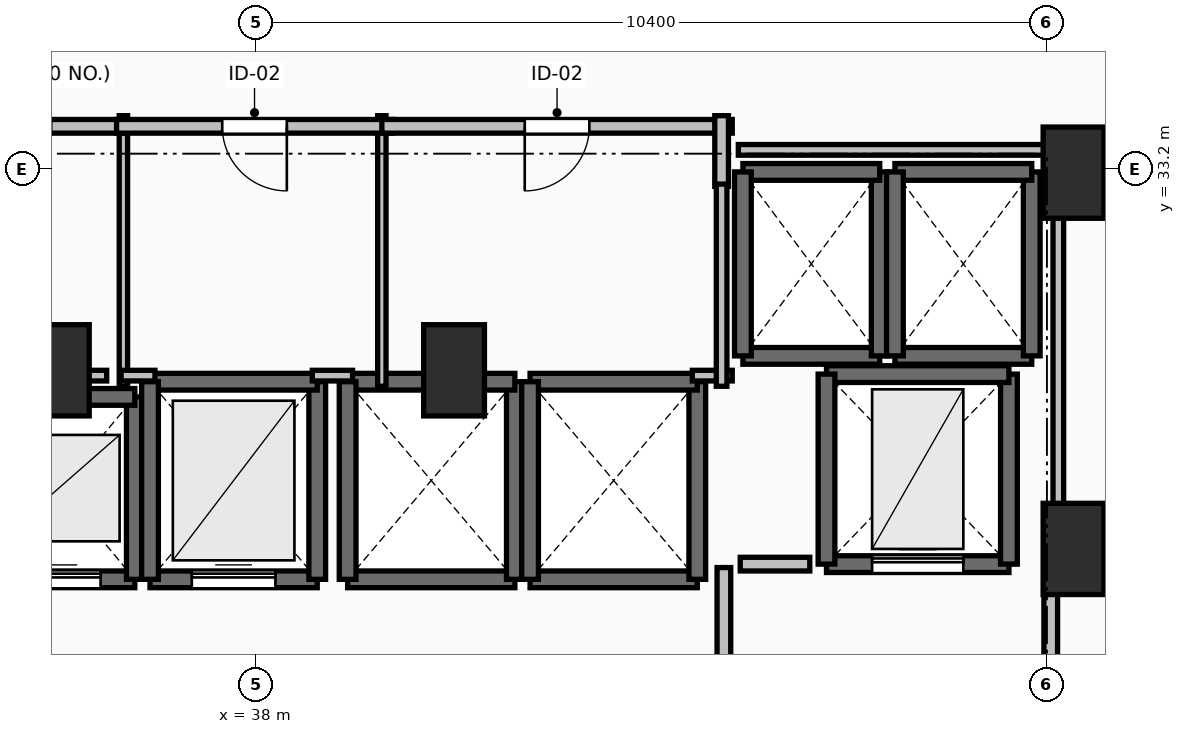
"""IFC4 building model, lengths in metres.
Left out: names, types, materials, properties, quantities, classifications, styles, units other than length and angle.
Written with IfcOpenShell. Run it as: python <this file> out.ifc"""

import sys

from ifc_helpers import new_model, si_unit, direction, frame, frame_2d, origin, origin_2d, place, context, subcontext, project, spatial, rectangle, extrude, element, fill, save


model = new_model("IFC4")
c1 = context("Model", 3, precision=1e-05, world=origin(), true_north=direction((0.0, 1.0)))
c2 = subcontext(c1, "Body", "Model", "MODEL_VIEW")
j1 = project(units=[si_unit("LENGTHUNIT", "METRE"), si_unit("PLANEANGLEUNIT", "RADIAN")], contexts=[c1])
p1 = place(None, origin())
s1 = spatial("IfcSite", under=j1, at=p1, CompositionType="ELEMENT")
p2 = place(p1, origin())
s2 = spatial("IfcBuilding", under=s1, at=p2, CompositionType="ELEMENT")
p3 = place(p2, frame((0.0, 0.0, 24.0)))
s3 = spatial("IfcBuildingStorey", under=s2, at=p3, CompositionType="ELEMENT", Elevation=24.0)
for number, where, z_axis, x_axis in (
    (1, (48.75, 33.15, 0.0), (0.0, 0.0, 1.0), (1.0, 0.0, 0.0)),
    (2, (48.75, 28.2, 0.0), (0.0, 0.0, 1.0), (1.0, 0.0, 0.0)),
    (3, (35.4, 30.55, 0.0), (0.0, 0.0, 1.0), (1.0, 0.0, 0.0)),
    (4, (40.6, 30.55, 0.0), (0.0, 0.0, 1.0), (1.0, 0.0, 0.0)),
):
    element("IfcColumn", number, at=place(p3, frame(where, z_axis=z_axis, x_axis=x_axis)), inside=s3, PredefinedType="PILASTER", context=c2, shape_type="SweptSolid", body=[
        extrude(rectangle(XDim=0.8, YDim=1.2, at=origin_2d()), origin(), (0.0, 0.0, 1.0), 3.5),
    ])
p4 = place(p3, frame((34.4, 27.8, 0.0), z_axis=(0.0, 0.0, 1.0), x_axis=(1.0, 0.0, 0.0)))
e5 = element("IfcWall", 5, at=p4, inside=s3, PredefinedType="SOLIDWALL", context=c2, shape_type="SweptSolid", body=[
    extrude(rectangle(XDim=2.0, YDim=0.22, at=frame_2d((1.0, 0.0))), origin(), (0.0, 0.0, 1.0), 3.24),
])
p5 = place(p4, frame((0.45, 0.0, 0.0)))
e6 = element("IfcOpeningElement", 6, at=p5, cuts=e5, PredefinedType="OPENING", context=c2, shape_type="SweptSolid", body=[
    extrude(rectangle(XDim=1.1, YDim=2.2, at=frame_2d((0.55, 1.1))), frame((0.0, 0.125, 0.0), z_axis=(0.0, -1.0, 0.0), x_axis=(1.0, 0.0, 0.0)), (0.0, 0.0, 1.0), 0.25),
])
p6 = place(p3, frame((36.4, 27.8, 0.0), z_axis=(0.0, 0.0, 1.0), x_axis=(0.0, 1.0, 0.0)))
e7 = element("IfcWall", 7, at=p6, inside=s3, PredefinedType="SOLIDWALL", context=c2, shape_type="SweptSolid", body=[
    extrude(rectangle(XDim=2.4, YDim=0.22, at=frame_2d((1.2, 0.0))), origin(), (0.0, 0.0, 1.0), 3.24),
])
p7 = place(p3, frame((36.4, 30.2, 0.0), z_axis=(0.0, 0.0, 1.0), x_axis=(-1.0, 0.0, 0.0)))
e8 = element("IfcWall", 8, at=p7, inside=s3, PredefinedType="SOLIDWALL", context=c2, shape_type="SweptSolid", body=[
    extrude(rectangle(XDim=2.0, YDim=0.22, at=frame_2d((1.0, 0.0))), origin(), (0.0, 0.0, 1.0), 3.24),
])
p8 = place(p3, frame((36.6, 27.8, 0.0), z_axis=(0.0, 0.0, 1.0), x_axis=(1.0, 0.0, 0.0)))
e9 = element("IfcWall", 9, at=p8, inside=s3, PredefinedType="SOLIDWALL", context=c2, shape_type="SweptSolid", body=[
    extrude(rectangle(XDim=2.2, YDim=0.22, at=frame_2d((1.1, 0.0))), origin(), (0.0, 0.0, 1.0), 3.24),
])
p9 = place(p8, frame((0.55, 0.0, 0.0)))
e10 = element("IfcOpeningElement", 10, at=p9, cuts=e9, PredefinedType="OPENING", context=c2, shape_type="SweptSolid", body=[
    extrude(rectangle(XDim=1.1, YDim=2.2, at=frame_2d((0.55, 1.1))), frame((0.0, 0.125, 0.0), z_axis=(0.0, -1.0, 0.0), x_axis=(1.0, 0.0, 0.0)), (0.0, 0.0, 1.0), 0.25),
])
p10 = place(p3, frame((38.8, 27.8, 0.0), z_axis=(0.0, 0.0, 1.0), x_axis=(0.0, 1.0, 0.0)))
e11 = element("IfcWall", 11, at=p10, inside=s3, PredefinedType="SOLIDWALL", context=c2, shape_type="SweptSolid", body=[
    extrude(rectangle(XDim=2.6, YDim=0.22, at=frame_2d((1.3, 0.0))), origin(), (0.0, 0.0, 1.0), 3.24),
])
p11 = place(p3, frame((38.8, 30.4, 0.0), z_axis=(0.0, 0.0, 1.0), x_axis=(-1.0, 0.0, 0.0)))
e12 = element("IfcWall", 12, at=p11, inside=s3, PredefinedType="SOLIDWALL", context=c2, shape_type="SweptSolid", body=[
    extrude(rectangle(XDim=2.2, YDim=0.22, at=frame_2d((1.1, 0.0))), origin(), (0.0, 0.0, 1.0), 3.24),
])
p12 = place(p3, frame((36.6, 30.4, 0.0), z_axis=(0.0, 0.0, 1.0), x_axis=(0.0, -1.0, 0.0)))
e13 = element("IfcWall", 13, at=p12, inside=s3, PredefinedType="SOLIDWALL", context=c2, shape_type="SweptSolid", body=[
    extrude(rectangle(XDim=2.6, YDim=0.22, at=frame_2d((1.3, 0.0))), origin(), (0.0, 0.0, 1.0), 3.24),
])
p13 = place(p3, frame((39.2, 27.8, 0.0), z_axis=(0.0, 0.0, 1.0), x_axis=(1.0, 0.0, 0.0)))
e14 = element("IfcWall", 14, at=p13, inside=s3, PredefinedType="SOLIDWALL", context=c2, shape_type="SweptSolid", body=[
    extrude(rectangle(XDim=2.2, YDim=0.22, at=frame_2d((1.1, 0.0))), origin(), (0.0, 0.0, 1.0), 3.24),
])
p14 = place(p3, frame((41.4, 27.8, 0.0), z_axis=(0.0, 0.0, 1.0), x_axis=(0.0, 1.0, 0.0)))
e15 = element("IfcWall", 15, at=p14, inside=s3, PredefinedType="SOLIDWALL", context=c2, shape_type="SweptSolid", body=[
    extrude(rectangle(XDim=2.6, YDim=0.22, at=frame_2d((1.3, 0.0))), origin(), (0.0, 0.0, 1.0), 3.24),
])
p15 = place(p3, frame((41.4, 30.4, 0.0), z_axis=(0.0, 0.0, 1.0), x_axis=(-1.0, 0.0, 0.0)))
e16 = element("IfcWall", 16, at=p15, inside=s3, PredefinedType="SOLIDWALL", context=c2, shape_type="SweptSolid", body=[
    extrude(rectangle(XDim=2.2, YDim=0.22, at=frame_2d((1.1, 0.0))), origin(), (0.0, 0.0, 1.0), 3.24),
])
p16 = place(p3, frame((39.2, 30.4, 0.0), z_axis=(0.0, 0.0, 1.0), x_axis=(0.0, -1.0, 0.0)))
e17 = element("IfcWall", 17, at=p16, inside=s3, PredefinedType="SOLIDWALL", context=c2, shape_type="SweptSolid", body=[
    extrude(rectangle(XDim=2.6, YDim=0.22, at=frame_2d((1.3, 0.0))), origin(), (0.0, 0.0, 1.0), 3.24),
])
p17 = place(p3, frame((41.6, 27.8, 0.0), z_axis=(0.0, 0.0, 1.0), x_axis=(1.0, 0.0, 0.0)))
e18 = element("IfcWall", 18, at=p17, inside=s3, PredefinedType="SOLIDWALL", context=c2, shape_type="SweptSolid", body=[
    extrude(rectangle(XDim=2.2, YDim=0.22, at=frame_2d((1.1, 0.0))), origin(), (0.0, 0.0, 1.0), 3.24),
])
p18 = place(p3, frame((43.8, 27.8, 0.0), z_axis=(0.0, 0.0, 1.0), x_axis=(0.0, 1.0, 0.0)))
e19 = element("IfcWall", 19, at=p18, inside=s3, PredefinedType="SOLIDWALL", context=c2, shape_type="SweptSolid", body=[
    extrude(rectangle(XDim=2.6, YDim=0.22, at=frame_2d((1.3, 0.0))), origin(), (0.0, 0.0, 1.0), 3.24),
])
p19 = place(p3, frame((43.8, 30.4, 0.0), z_axis=(0.0, 0.0, 1.0), x_axis=(-1.0, 0.0, 0.0)))
e20 = element("IfcWall", 20, at=p19, inside=s3, PredefinedType="SOLIDWALL", context=c2, shape_type="SweptSolid", body=[
    extrude(rectangle(XDim=2.2, YDim=0.22, at=frame_2d((1.1, 0.0))), origin(), (0.0, 0.0, 1.0), 3.24),
])
p20 = place(p3, frame((41.6, 30.4, 0.0), z_axis=(0.0, 0.0, 1.0), x_axis=(0.0, -1.0, 0.0)))
e21 = element("IfcWall", 21, at=p20, inside=s3, PredefinedType="SOLIDWALL", context=c2, shape_type="SweptSolid", body=[
    extrude(rectangle(XDim=2.6, YDim=0.22, at=frame_2d((1.3, 0.0))), origin(), (0.0, 0.0, 1.0), 3.24),
])
p21 = place(p3, frame((44.4, 30.74, 0.0), z_axis=(0.0, 0.0, 1.0), x_axis=(1.0, 0.0, 0.0)))
e22 = element("IfcWall", 22, at=p21, inside=s3, PredefinedType="SOLIDWALL", context=c2, shape_type="SweptSolid", body=[
    extrude(rectangle(XDim=1.8, YDim=0.22, at=frame_2d((0.9, 0.0))), origin(), (0.0, 0.0, 1.0), 3.24),
])
p22 = place(p3, frame((46.2, 30.74, 0.0), z_axis=(0.0, 0.0, 1.0), x_axis=(0.0, 1.0, 0.0)))
e23 = element("IfcWall", 23, at=p22, inside=s3, PredefinedType="SOLIDWALL", context=c2, shape_type="SweptSolid", body=[
    extrude(rectangle(XDim=2.42, YDim=0.22, at=frame_2d((1.21, 0.0))), origin(), (0.0, 0.0, 1.0), 3.24),
])
p23 = place(p3, frame((46.2, 33.16, 0.0), z_axis=(0.0, 0.0, 1.0), x_axis=(-1.0, 0.0, 0.0)))
e24 = element("IfcWall", 24, at=p23, inside=s3, PredefinedType="SOLIDWALL", context=c2, shape_type="SweptSolid", body=[
    extrude(rectangle(XDim=1.8, YDim=0.22, at=frame_2d((0.9, 0.0))), origin(), (0.0, 0.0, 1.0), 3.24),
])
p24 = place(p3, frame((44.4, 33.16, 0.0), z_axis=(0.0, 0.0, 1.0), x_axis=(0.0, -1.0, 0.0)))
e25 = element("IfcWall", 25, at=p24, inside=s3, PredefinedType="SOLIDWALL", context=c2, shape_type="SweptSolid", body=[
    extrude(rectangle(XDim=2.42, YDim=0.22, at=frame_2d((1.21, 0.0))), origin(), (0.0, 0.0, 1.0), 3.24),
])
p25 = place(p3, frame((46.4, 30.74, 0.0), z_axis=(0.0, 0.0, 1.0), x_axis=(1.0, 0.0, 0.0)))
e26 = element("IfcWall", 26, at=p25, inside=s3, PredefinedType="SOLIDWALL", context=c2, shape_type="SweptSolid", body=[
    extrude(rectangle(XDim=1.8, YDim=0.22, at=frame_2d((0.9, 0.0))), origin(), (0.0, 0.0, 1.0), 3.24),
])
p26 = place(p3, frame((48.2, 30.74, 0.0), z_axis=(0.0, 0.0, 1.0), x_axis=(0.0, 1.0, 0.0)))
e27 = element("IfcWall", 27, at=p26, inside=s3, PredefinedType="SOLIDWALL", context=c2, shape_type="SweptSolid", body=[
    extrude(rectangle(XDim=2.42, YDim=0.22, at=frame_2d((1.21, 0.0))), origin(), (0.0, 0.0, 1.0), 3.24),
])
p27 = place(p3, frame((48.2, 33.16, 0.0), z_axis=(0.0, 0.0, 1.0), x_axis=(-1.0, 0.0, 0.0)))
e28 = element("IfcWall", 28, at=p27, inside=s3, PredefinedType="SOLIDWALL", context=c2, shape_type="SweptSolid", body=[
    extrude(rectangle(XDim=1.8, YDim=0.22, at=frame_2d((0.9, 0.0))), origin(), (0.0, 0.0, 1.0), 3.24),
])
p28 = place(p3, frame((46.4, 33.16, 0.0), z_axis=(0.0, 0.0, 1.0), x_axis=(0.0, -1.0, 0.0)))
e29 = element("IfcWall", 29, at=p28, inside=s3, PredefinedType="SOLIDWALL", context=c2, shape_type="SweptSolid", body=[
    extrude(rectangle(XDim=2.42, YDim=0.22, at=frame_2d((1.21, 0.0))), origin(), (0.0, 0.0, 1.0), 3.24),
])
p29 = place(p3, frame((45.5, 28.0, 0.0), z_axis=(0.0, 0.0, 1.0), x_axis=(1.0, 0.0, 0.0)))
e30 = element("IfcWall", 30, at=p29, inside=s3, PredefinedType="SHEAR", context=c2, shape_type="SweptSolid", body=[
    extrude(rectangle(XDim=2.4, YDim=0.22, at=frame_2d((1.2, 0.0))), origin(), (0.0, 0.0, 1.0), 3.24),
])
p30 = place(p29, frame((0.6, 0.0, 0.0)))
e31 = element("IfcOpeningElement", 31, at=p30, cuts=e30, PredefinedType="OPENING", context=c2, shape_type="SweptSolid", body=[
    extrude(rectangle(XDim=1.2, YDim=2.2, at=frame_2d((0.6, 1.1))), frame((0.0, 0.125, 0.0), z_axis=(0.0, -1.0, 0.0), x_axis=(1.0, 0.0, 0.0)), (0.0, 0.0, 1.0), 0.25),
])
p31 = place(p3, frame((47.9, 28.0, 0.0), z_axis=(0.0, 0.0, 1.0), x_axis=(0.0, 1.0, 0.0)))
e32 = element("IfcWall", 32, at=p31, inside=s3, PredefinedType="SHEAR", context=c2, shape_type="SweptSolid", body=[
    extrude(rectangle(XDim=2.5, YDim=0.22, at=frame_2d((1.25, 0.0))), origin(), (0.0, 0.0, 1.0), 3.24),
])
p32 = place(p3, frame((47.9, 30.5, 0.0), z_axis=(0.0, 0.0, 1.0), x_axis=(-1.0, 0.0, 0.0)))
e33 = element("IfcWall", 33, at=p32, inside=s3, PredefinedType="SHEAR", context=c2, shape_type="SweptSolid", body=[
    extrude(rectangle(XDim=2.4, YDim=0.22, at=frame_2d((1.2, 0.0))), origin(), (0.0, 0.0, 1.0), 3.24),
])
p33 = place(p3, frame((45.5, 30.5, 0.0), z_axis=(0.0, 0.0, 1.0), x_axis=(0.0, -1.0, 0.0)))
e34 = element("IfcWall", 34, at=p33, inside=s3, PredefinedType="SHEAR", context=c2, shape_type="SweptSolid", body=[
    extrude(rectangle(XDim=2.5, YDim=0.22, at=frame_2d((1.25, 0.0))), origin(), (0.0, 0.0, 1.0), 3.24),
])
p34 = place(p3, frame((44.15, 27.955, 0.0), z_axis=(0.0, 0.0, 1.0), x_axis=(0.0, -1.0, 0.0)))
e35 = element("IfcWall", 35, at=p34, inside=s3, PredefinedType="PARTITIONING", context=c2, shape_type="SweptSolid", body=[
    extrude(rectangle(XDim=3.91, YDim=0.18, at=frame_2d((1.955, 0.0))), origin(), (0.0, 0.0, 1.0), 3.24),
])
p35 = place(p34, frame((1.355, 0.0, 0.0)))
e36 = element("IfcOpeningElement", 36, at=p35, cuts=e35, PredefinedType="OPENING", context=c2, shape_type="SweptSolid", body=[
    extrude(rectangle(XDim=1.2, YDim=2.15, at=frame_2d((0.6, 1.075))), frame((0.0, 0.105, 0.0), z_axis=(0.0, -1.0, 0.0), x_axis=(1.0, 0.0, 0.0)), (0.0, 0.0, 1.0), 0.21),
])
p36 = place(p3, frame((48.45, 23.95, 0.0), z_axis=(0.0, 0.0, 1.0), x_axis=(0.0, 1.0, 0.0)))
e37 = element("IfcWall", 37, at=p36, inside=s3, PredefinedType="PARTITIONING", context=c2, shape_type="SweptSolid", body=[
    extrude(rectangle(XDim=4.05, YDim=0.18, at=frame_2d((2.025, 0.0))), origin(), (0.0, 0.0, 1.0), 3.24),
])
p37 = place(p36, frame((1.425, 0.0, 0.0)))
e38 = element("IfcOpeningElement", 38, at=p37, cuts=e37, PredefinedType="OPENING", context=c2, shape_type="SweptSolid", body=[
    extrude(rectangle(XDim=1.2, YDim=2.15, at=frame_2d((0.6, 1.075))), frame((0.0, 0.105, 0.0), z_axis=(0.0, -1.0, 0.0), x_axis=(1.0, 0.0, 0.0)), (0.0, 0.0, 1.0), 0.21),
])
p38 = place(p3, frame((36.25, 30.34, 0.0), z_axis=(0.0, 0.0, 1.0), x_axis=(0.0, 1.0, 0.0)))
e39 = element("IfcWall", 39, at=p38, inside=s3, PredefinedType="PARTITIONING", context=c2, shape_type="SweptSolid", body=[
    extrude(rectangle(XDim=3.56, YDim=0.11, at=frame_2d((1.78, 0.0))), origin(), (0.0, 0.0, 1.0), 2.432),
])
p39 = place(p3, frame((36.25, 33.76, 0.0), z_axis=(0.0, 0.0, 1.0), x_axis=(-1.0, 0.0, 0.0)))
e40 = element("IfcWall", 40, at=p39, inside=s3, PredefinedType="PARTITIONING", context=c2, shape_type="SweptSolid", body=[
    extrude(rectangle(XDim=2.75, YDim=0.18, at=frame_2d((1.375, 0.0))), origin(), (0.0, 0.0, 1.0), 3.24),
])
p40 = place(p39, frame((0.95, 0.0, 0.0)))
e41 = element("IfcOpeningElement", 41, at=p40, cuts=e40, PredefinedType="OPENING", context=c2, shape_type="SweptSolid", body=[
    extrude(rectangle(XDim=0.85, YDim=2.1, at=frame_2d((0.425, 1.05))), frame((0.0, 0.105, 0.0), z_axis=(0.0, -1.0, 0.0), x_axis=(1.0, 0.0, 0.0)), (0.0, 0.0, 1.0), 0.21),
])
p41 = place(p3, frame((39.65, 30.34, 0.0), z_axis=(0.0, 0.0, 1.0), x_axis=(0.0, 1.0, 0.0)))
e42 = element("IfcWall", 42, at=p41, inside=s3, PredefinedType="PARTITIONING", context=c2, shape_type="SweptSolid", body=[
    extrude(rectangle(XDim=3.56, YDim=0.11, at=frame_2d((1.78, 0.0))), origin(), (0.0, 0.0, 1.0), 2.432),
])
p42 = place(p3, frame((39.79, 33.76, 0.0), z_axis=(0.0, 0.0, 1.0), x_axis=(-1.0, 0.0, 0.0)))
e43 = element("IfcWall", 43, at=p42, inside=s3, PredefinedType="PARTITIONING", context=c2, shape_type="SweptSolid", body=[
    extrude(rectangle(XDim=3.63, YDim=0.18, at=frame_2d((1.815, 0.0))), origin(), (0.0, 0.0, 1.0), 3.24),
])
p43 = place(p42, frame((1.39, 0.0, 0.0)))
e44 = element("IfcOpeningElement", 44, at=p43, cuts=e43, PredefinedType="OPENING", context=c2, shape_type="SweptSolid", body=[
    extrude(rectangle(XDim=0.85, YDim=2.1, at=frame_2d((0.425, 1.05))), frame((0.0, 0.105, 0.0), z_axis=(0.0, -1.0, 0.0), x_axis=(1.0, 0.0, 0.0)), (0.0, 0.0, 1.0), 0.21),
])
p44 = place(p3, frame((44.26, 33.76, 0.0), z_axis=(0.0, 0.0, 1.0), x_axis=(-1.0, 0.0, 0.0)))
e45 = element("IfcWall", 45, at=p44, inside=s3, PredefinedType="PARTITIONING", context=c2, shape_type="SweptSolid", body=[
    extrude(rectangle(XDim=4.61, YDim=0.18, at=frame_2d((2.305, 0.0))), origin(), (0.0, 0.0, 1.0), 3.24),
])
p45 = place(p44, frame((1.88, 0.0, 0.0)))
e46 = element("IfcOpeningElement", 46, at=p45, cuts=e45, PredefinedType="OPENING", context=c2, shape_type="SweptSolid", body=[
    extrude(rectangle(XDim=0.85, YDim=2.1, at=frame_2d((0.425, 1.05))), frame((0.0, 0.105, 0.0), z_axis=(0.0, -1.0, 0.0), x_axis=(1.0, 0.0, 0.0)), (0.0, 0.0, 1.0), 0.21),
])
p46 = place(p3, frame((44.12, 32.97, 0.0), z_axis=(0.0, 0.0, 1.0), x_axis=(0.0, 1.0, 0.0)))
e47 = element("IfcWall", 47, at=p46, inside=s3, PredefinedType="PARTITIONING", context=c2, shape_type="SweptSolid", body=[
    extrude(rectangle(XDim=0.93, YDim=0.18, at=frame_2d((0.465, 0.0))), origin(), (0.0, 0.0, 1.0), 3.24),
])
p47 = place(p3, frame((45.28, 28.0, 0.0), z_axis=(0.0, 0.0, 1.0), x_axis=(-1.0, 0.0, 0.0)))
e48 = element("IfcWall", 48, at=p47, inside=s3, PredefinedType="PARTITIONING", context=c2, shape_type="SweptSolid", body=[
    extrude(rectangle(XDim=0.915, YDim=0.18, at=frame_2d((0.458, 0.0))), origin(), (0.0, 0.0, 1.0), 3.24),
])
p48 = place(p3, frame((33.7, 30.48, 0.0), z_axis=(0.0, 0.0, 1.0), x_axis=(1.0, 0.0, 0.0)))
e49 = element("IfcWall", 49, at=p48, inside=s3, PredefinedType="PARTITIONING", context=c2, shape_type="SweptSolid", body=[
    extrude(rectangle(XDim=2.33, YDim=0.14, at=frame_2d((1.165, 0.0))), origin(), (0.0, 0.0, 1.0), 2.432),
])
p49 = place(p3, frame((36.22, 30.48, 0.0), z_axis=(0.0, 0.0, 1.0), x_axis=(1.0, 0.0, 0.0)))
e50 = element("IfcWall", 50, at=p49, inside=s3, PredefinedType="PARTITIONING", context=c2, shape_type="SweptSolid", body=[
    extrude(rectangle(XDim=0.445, YDim=0.14, at=frame_2d((0.223, 0.0))), origin(), (0.0, 0.0, 1.0), 2.432),
])
p50 = place(p3, frame((38.735, 30.48, 0.0), z_axis=(0.0, 0.0, 1.0), x_axis=(1.0, 0.0, 0.0)))
e51 = element("IfcWall", 51, at=p50, inside=s3, PredefinedType="PARTITIONING", context=c2, shape_type="SweptSolid", body=[
    extrude(rectangle(XDim=0.53, YDim=0.14, at=frame_2d((0.265, 0.0))), origin(), (0.0, 0.0, 1.0), 2.432),
])
p51 = place(p3, frame((43.735, 30.48, 0.0), z_axis=(0.0, 0.0, 1.0), x_axis=(1.0, 0.0, 0.0)))
e52 = element("IfcWall", 52, at=p51, inside=s3, PredefinedType="PARTITIONING", context=c2, shape_type="SweptSolid", body=[
    extrude(rectangle(XDim=0.525, YDim=0.14, at=frame_2d((0.262, 0.0))), origin(), (0.0, 0.0, 1.0), 3.24),
])
p52 = place(p3, frame((44.12, 30.34, 0.0), z_axis=(0.0, 0.0, 1.0), x_axis=(0.0, 1.0, 0.0)))
e53 = element("IfcWall", 53, at=p52, inside=s3, PredefinedType="PARTITIONING", context=c2, shape_type="SweptSolid", body=[
    extrude(rectangle(XDim=2.66, YDim=0.14, at=frame_2d((1.33, 0.0))), origin(), (0.0, 0.0, 1.0), 3.24),
])
p53 = place(p3, frame((44.34, 33.45, 0.0), z_axis=(0.0, 0.0, 1.0), x_axis=(1.0, 0.0, 0.0)))
e54 = element("IfcWall", 54, at=p53, inside=s3, PredefinedType="PARTITIONING", context=c2, shape_type="SweptSolid", body=[
    extrude(rectangle(XDim=4.21, YDim=0.14, at=frame_2d((2.105, 0.0))), origin(), (0.0, 0.0, 1.0), 2.432),
])
p54 = place(p3, frame((48.55, 33.45, 0.0), z_axis=(0.0, 0.0, 1.0), x_axis=(0.0, -1.0, 0.0)))
e55 = element("IfcWall", 55, at=p54, inside=s3, PredefinedType="PARTITIONING", context=c2, shape_type="SweptSolid", body=[
    extrude(rectangle(XDim=5.254, YDim=0.14, at=frame_2d((2.627, 0.0))), origin(), (0.0, 0.0, 1.0), 2.432),
])
p55 = place(p5, origin())
e56 = element("IfcDoor", 56, at=p55, inside=s3, OperationType="SLIDING_TO_LEFT", PredefinedType="DOOR", context=c2, shape_type="SweptSolid", body=[
    extrude(rectangle(XDim=1.1, YDim=2.2, at=frame_2d((0.55, 1.1))), frame((0.0, 0.025, 0.0), z_axis=(0.0, -1.0, 0.0), x_axis=(1.0, 0.0, 0.0)), (0.0, 0.0, 1.0), 0.05),
])
fill(e6, e56)
p56 = place(p9, origin())
e57 = element("IfcDoor", 57, at=p56, inside=s3, OperationType="SLIDING_TO_LEFT", PredefinedType="DOOR", context=c2, shape_type="SweptSolid", body=[
    extrude(rectangle(XDim=1.1, YDim=2.2, at=frame_2d((0.55, 1.1))), frame((0.0, 0.025, 0.0), z_axis=(0.0, -1.0, 0.0), x_axis=(1.0, 0.0, 0.0)), (0.0, 0.0, 1.0), 0.05),
])
fill(e10, e57)
p57 = place(p30, origin())
e58 = element("IfcDoor", 58, at=p57, inside=s3, OperationType="SLIDING_TO_LEFT", PredefinedType="DOOR", context=c2, shape_type="SweptSolid", body=[
    extrude(rectangle(XDim=1.2, YDim=2.2, at=frame_2d((0.6, 1.1))), frame((0.0, 0.025, 0.0), z_axis=(0.0, -1.0, 0.0), x_axis=(1.0, 0.0, 0.0)), (0.0, 0.0, 1.0), 0.05),
])
fill(e31, e58)
p58 = place(p43, origin())
e59 = element("IfcDoor", 59, at=p58, inside=s3, OperationType="SINGLE_SWING_LEFT", PredefinedType="DOOR", context=c2, shape_type="SweptSolid", body=[
    extrude(rectangle(XDim=0.85, YDim=2.1, at=frame_2d((0.425, 1.05))), frame((0.0, 0.025, 0.0), z_axis=(0.0, -1.0, 0.0), x_axis=(1.0, 0.0, 0.0)), (0.0, 0.0, 1.0), 0.05),
])
fill(e44, e59)
p59 = place(p45, origin())
e60 = element("IfcDoor", 60, at=p59, inside=s3, OperationType="SINGLE_SWING_RIGHT", PredefinedType="DOOR", context=c2, shape_type="SweptSolid", body=[
    extrude(rectangle(XDim=0.85, YDim=2.1, at=frame_2d((0.425, 1.05))), frame((0.0, 0.025, 0.0), z_axis=(0.0, -1.0, 0.0), x_axis=(1.0, 0.0, 0.0)), (0.0, 0.0, 1.0), 0.05),
])
fill(e46, e60)
save(model, sys.argv[1])
